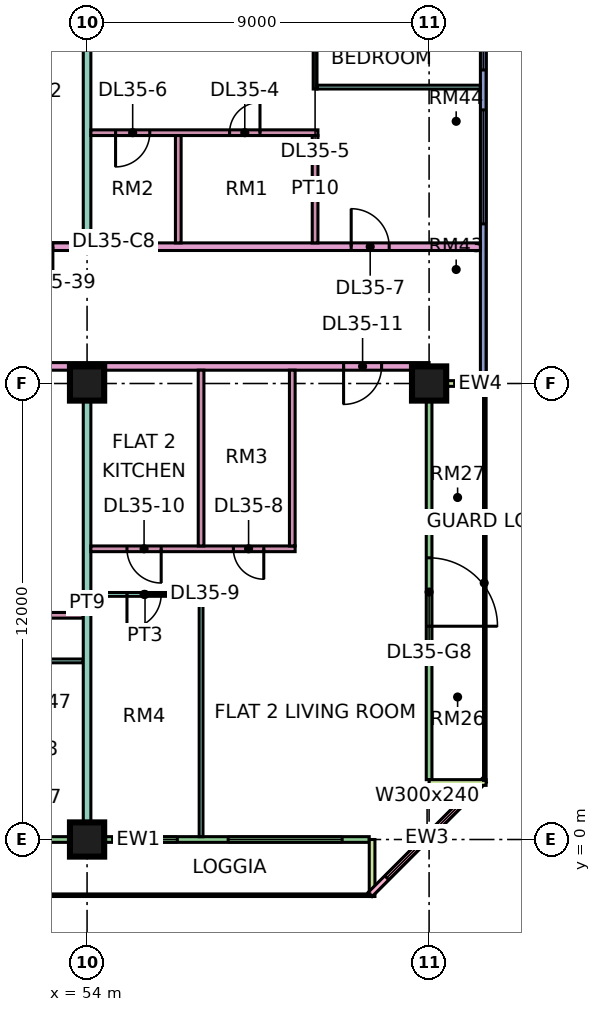
"""IFC4 building model, lengths in metres.
Left out: names, types, materials, properties, quantities, classifications, styles, units other than length and angle.
Written with IfcOpenShell. Run it as: python <this file> out.ifc"""

import sys

from ifc_helpers import new_model, si_unit, direction, frame, frame_2d, origin, origin_2d, place, context, subcontext, project, spatial, rectangle, extrude, element, fill, save


model = new_model("IFC4")
c1 = context("Model", 3, precision=1e-05, world=origin(), true_north=direction((0.0, 1.0)))
c2 = subcontext(c1, "Body", "Model", "MODEL_VIEW")
j1 = project(units=[si_unit("LENGTHUNIT", "METRE"), si_unit("PLANEANGLEUNIT", "RADIAN")], contexts=[c1])
p1 = place(None, origin())
s1 = spatial("IfcSite", under=j1, at=p1, CompositionType="ELEMENT")
p2 = place(p1, origin())
s2 = spatial("IfcBuilding", under=s1, at=p2, CompositionType="ELEMENT")
p3 = place(p2, frame((0.0, 0.0, 157.4)))
s3 = spatial("IfcBuildingStorey", under=s2, at=p3, CompositionType="ELEMENT", Elevation=157.4)
for number, where, z_axis, x_axis in (
    (1, (54.0, 0.0, 0.0), (0.0, 0.0, 1.0), (1.0, 0.0, 0.0)),
    (2, (54.0, 12.0, 0.0), (0.0, 0.0, 1.0), (1.0, 0.0, 0.0)),
    (3, (63.0, 12.0, 0.0), (0.0, 0.0, 1.0), (1.0, 0.0, 0.0)),
):
    element("IfcColumn", number, at=place(p3, frame(where, z_axis=z_axis, x_axis=x_axis)), inside=s3, PredefinedType="COLUMN", context=c2, shape_type="SweptSolid", body=[
        extrude(rectangle(XDim=0.9, YDim=0.9, at=origin_2d()), origin(), (0.0, 0.0, 1.0), 3.75),
    ])
p4 = place(p3, frame((48.075, 0.0, 0.0), z_axis=(0.0, 0.0, 1.0), x_axis=(1.0, 0.0, 0.0)))
e4 = element("IfcWall", 4, at=p4, inside=s3, PredefinedType="SOLIDWALL", context=c2, shape_type="SweptSolid", body=[
    extrude(rectangle(XDim=13.35, YDim=0.15, at=frame_2d((6.675, 0.0))), origin(), (0.0, 0.0, 1.0), 3.35),
])
p5 = place(p4, frame((0.562, 0.0, 0.45)))
e5 = element("IfcOpeningElement", 5, at=p5, cuts=e4, PredefinedType="OPENING", context=c2, shape_type="SweptSolid", body=[
    extrude(rectangle(XDim=1.8, YDim=2.4, at=frame_2d((0.9, 1.2))), frame((0.0, 0.085, 0.0), z_axis=(0.0, -1.0, 0.0), x_axis=(1.0, 0.0, 0.0)), (0.0, 0.0, 1.0), 0.17),
])
p6 = place(p4, frame((3.55, 0.0, 0.0)))
e6 = element("IfcOpeningElement", 6, at=p6, cuts=e4, PredefinedType="OPENING", context=c2, shape_type="SweptSolid", body=[
    extrude(rectangle(XDim=1.2, YDim=2.4, at=frame_2d((0.6, 1.2))), frame((0.0, 0.085, 0.0), z_axis=(0.0, -1.0, 0.0), x_axis=(1.0, 0.0, 0.0)), (0.0, 0.0, 1.0), 0.17),
])
p7 = place(p4, frame((7.1, 0.0, 0.45)))
e7 = element("IfcOpeningElement", 7, at=p7, cuts=e4, PredefinedType="OPENING", context=c2, shape_type="SweptSolid", body=[
    extrude(rectangle(XDim=1.2, YDim=2.4, at=frame_2d((0.6, 1.2))), frame((0.0, 0.085, 0.0), z_axis=(0.0, -1.0, 0.0), x_axis=(1.0, 0.0, 0.0)), (0.0, 0.0, 1.0), 0.17),
])
p8 = place(p4, frame((9.637, 0.0, 0.45)))
e8 = element("IfcOpeningElement", 8, at=p8, cuts=e4, PredefinedType="OPENING", context=c2, shape_type="SweptSolid", body=[
    extrude(rectangle(XDim=3.0, YDim=2.4, at=frame_2d((1.5, 1.2))), frame((0.0, 0.085, 0.0), z_axis=(0.0, -1.0, 0.0), x_axis=(1.0, 0.0, 0.0)), (0.0, 0.0, 1.0), 0.17),
])
p9 = place(p3, frame((61.5, -1.5, 0.0), z_axis=(0.0, 0.0, 1.0), x_axis=(0.0, 1.0, 0.0)))
e9 = element("IfcWall", 9, at=p9, inside=s3, PredefinedType="SOLIDWALL", context=c2, shape_type="SweptSolid", body=[
    extrude(rectangle(XDim=1.5, YDim=0.15, at=frame_2d((0.75, 0.0))), origin(), (0.0, 0.0, 1.0), 3.35),
])
p10 = place(p3, frame((61.447, -1.447, 0.0), z_axis=(0.0, 0.0, 1.0), x_axis=(0.707106781187, 0.707106781187, 0.0)))
e10 = element("IfcWall", 10, at=p10, inside=s3, PredefinedType="SOLIDWALL", context=c2, shape_type="SweptSolid", body=[
    extrude(rectangle(XDim=4.243, YDim=0.15, at=frame_2d((2.121, 0.0))), origin(), (0.0, 0.0, 1.0), 3.35),
])
p11 = place(p10, frame((0.621, 0.0, 0.45)))
e11 = element("IfcOpeningElement", 11, at=p11, cuts=e10, PredefinedType="OPENING", context=c2, shape_type="SweptSolid", body=[
    extrude(rectangle(XDim=3.0, YDim=2.4, at=frame_2d((1.5, 1.2))), frame((0.0, 0.085, 0.0), z_axis=(0.0, -1.0, 0.0), x_axis=(1.0, 0.0, 0.0)), (0.0, 0.0, 1.0), 0.17),
])
p12 = place(p3, frame((63.0, 1.575, 0.0), z_axis=(0.0, 0.0, 1.0), x_axis=(0.0, 1.0, 0.0)))
e12 = element("IfcWall", 12, at=p12, inside=s3, PredefinedType="SOLIDWALL", context=c2, shape_type="SweptSolid", body=[
    extrude(rectangle(XDim=10.35, YDim=0.15, at=frame_2d((5.175, 0.0))), origin(), (0.0, 0.0, 1.0), 3.35),
])
p13 = place(p12, frame((4.038, 0.0, 0.0)))
e13 = element("IfcOpeningElement", 13, at=p13, cuts=e12, PredefinedType="OPENING", context=c2, shape_type="SweptSolid", body=[
    extrude(rectangle(XDim=1.8, YDim=2.4, at=frame_2d((0.9, 1.2))), frame((0.0, 0.085, 0.0), z_axis=(0.0, -1.0, 0.0), x_axis=(1.0, 0.0, 0.0)), (0.0, 0.0, 1.0), 0.17),
])
for number, where, z_axis, x_axis in (
    (14, (64.5, 1.5, 0.0), (0.0, 0.0, 1.0), (-1.0, 0.0, 0.0)),
    (15, (64.5, 12.0, 0.0), (0.0, 0.0, 1.0), (-1.0, 0.0, 0.0)),
):
    element("IfcWall", number, at=place(p3, frame(where, z_axis=z_axis, x_axis=x_axis)), inside=s3, PredefinedType="SOLIDWALL", context=c2, shape_type="SweptSolid", body=[
        extrude(rectangle(XDim=1.5, YDim=0.15, at=frame_2d((0.75, 0.0))), origin(), (0.0, 0.0, 1.0), 3.35),
    ])
p14 = place(p3, frame((64.425, 12.075, 0.0), z_axis=(0.0, 0.0, 1.0), x_axis=(0.0, 1.0, 0.0)))
e16 = element("IfcWall", 16, at=p14, inside=s3, PredefinedType="SOLIDWALL", context=c2, shape_type="SweptSolid", body=[
    extrude(rectangle(XDim=10.425, YDim=0.15, at=frame_2d((5.212, 0.0))), origin(), (0.0, 0.0, 1.0), 3.35),
])
p15 = place(p14, frame((4.125, 0.0, 0.45)))
e17 = element("IfcOpeningElement", 17, at=p15, cuts=e16, PredefinedType="OPENING", context=c2, shape_type="SweptSolid", body=[
    extrude(rectangle(XDim=3.0, YDim=2.4, at=frame_2d((1.5, 1.2))), frame((0.0, 0.085, 0.0), z_axis=(0.0, -1.0, 0.0), x_axis=(1.0, 0.0, 0.0)), (0.0, 0.0, 1.0), 0.17),
])
p16 = place(p14, frame((8.175, 0.0, 0.45)))
e18 = element("IfcOpeningElement", 18, at=p16, cuts=e16, PredefinedType="OPENING", context=c2, shape_type="SweptSolid", body=[
    extrude(rectangle(XDim=1.8, YDim=2.4, at=frame_2d((0.9, 1.2))), frame((0.0, 0.085, 0.0), z_axis=(0.0, -1.0, 0.0), x_axis=(1.0, 0.0, 0.0)), (0.0, 0.0, 1.0), 0.17),
])
p17 = place(p3, frame((33.05, 4.7, 0.0), z_axis=(0.0, 0.0, 1.0), x_axis=(1.0, 0.0, 0.0)))
e19 = element("IfcWall", 19, at=p17, inside=s3, PredefinedType="PARTITIONING", context=c2, shape_type="SweptSolid", body=[
    extrude(rectangle(XDim=20.85, YDim=0.1, at=frame_2d((10.425, 0.0))), origin(), (0.0, 0.0, 1.0), 3.35),
])
p18 = place(p17, frame((1.0, 0.0, 0.0)))
e20 = element("IfcOpeningElement", 20, at=p18, cuts=e19, PredefinedType="OPENING", context=c2, shape_type="SweptSolid", body=[
    extrude(rectangle(XDim=0.9, YDim=2.1, at=frame_2d((0.45, 1.05))), frame((0.0, 0.06, 0.0), z_axis=(0.0, -1.0, 0.0), x_axis=(1.0, 0.0, 0.0)), (0.0, 0.0, 1.0), 0.12),
])
p19 = place(p17, frame((13.0, 0.0, 0.0)))
e21 = element("IfcOpeningElement", 21, at=p19, cuts=e19, PredefinedType="OPENING", context=c2, shape_type="SweptSolid", body=[
    extrude(rectangle(XDim=0.9, YDim=2.1, at=frame_2d((0.45, 1.05))), frame((0.0, 0.06, 0.0), z_axis=(0.0, -1.0, 0.0), x_axis=(1.0, 0.0, 0.0)), (0.0, 0.0, 1.0), 0.12),
])
p20 = place(p17, frame((16.0, 0.0, 0.0)))
e22 = element("IfcOpeningElement", 22, at=p20, cuts=e19, PredefinedType="OPENING", context=c2, shape_type="SweptSolid", body=[
    extrude(rectangle(XDim=0.9, YDim=2.1, at=frame_2d((0.45, 1.05))), frame((0.0, 0.06, 0.0), z_axis=(0.0, -1.0, 0.0), x_axis=(1.0, 0.0, 0.0)), (0.0, 0.0, 1.0), 0.12),
])
p21 = place(p17, frame((19.0, 0.0, 0.0)))
e23 = element("IfcOpeningElement", 23, at=p21, cuts=e19, PredefinedType="OPENING", context=c2, shape_type="SweptSolid", body=[
    extrude(rectangle(XDim=0.9, YDim=2.1, at=frame_2d((0.45, 1.05))), frame((0.0, 0.06, 0.0), z_axis=(0.0, -1.0, 0.0), x_axis=(1.0, 0.0, 0.0)), (0.0, 0.0, 1.0), 0.12),
])
p22 = place(p17, frame((7.0, 0.0, 0.0)))
e24 = element("IfcOpeningElement", 24, at=p22, cuts=e19, PredefinedType="OPENING", context=c2, shape_type="SweptSolid", body=[
    extrude(rectangle(XDim=0.9, YDim=2.1, at=frame_2d((0.45, 1.05))), frame((0.0, 0.06, 0.0), z_axis=(0.0, -1.0, 0.0), x_axis=(1.0, 0.0, 0.0)), (0.0, 0.0, 1.0), 0.12),
])
p23 = place(p3, frame((40.65, 12.45, 0.0), z_axis=(0.0, 0.0, 1.0), x_axis=(1.0, 0.0, 0.0)))
e25 = element("IfcWall", 25, at=p23, inside=s3, PredefinedType="PARTITIONING", context=c2, shape_type="SweptSolid", body=[
    extrude(rectangle(XDim=22.35, YDim=0.2, at=frame_2d((11.175, 0.0))), origin(), (0.0, 0.0, 1.0), 3.35),
])
p24 = place(p23, frame((20.1, 0.0, 0.0)))
e26 = element("IfcOpeningElement", 26, at=p24, cuts=e25, PredefinedType="OPENING", context=c2, shape_type="SweptSolid", body=[
    extrude(rectangle(XDim=1.0, YDim=2.1, at=frame_2d((0.5, 1.05))), frame((0.0, 0.11, 0.0), z_axis=(0.0, -1.0, 0.0), x_axis=(1.0, 0.0, 0.0)), (0.0, 0.0, 1.0), 0.22),
])
p25 = place(p23, frame((1.05, 0.0, 0.0)))
e27 = element("IfcOpeningElement", 27, at=p25, cuts=e25, PredefinedType="OPENING", context=c2, shape_type="SweptSolid", body=[
    extrude(rectangle(XDim=1.0, YDim=2.1, at=frame_2d((0.5, 1.05))), frame((0.0, 0.11, 0.0), z_axis=(0.0, -1.0, 0.0), x_axis=(1.0, 0.0, 0.0)), (0.0, 0.0, 1.0), 0.22),
])
p26 = place(p3, frame((43.575, 5.9, 0.0), z_axis=(0.0, 0.0, 1.0), x_axis=(1.0, 0.0, 0.0)))
e28 = element("IfcWall", 28, at=p26, inside=s3, PredefinedType="PARTITIONING", context=c2, shape_type="SweptSolid", body=[
    extrude(rectangle(XDim=10.325, YDim=0.15, at=frame_2d((5.163, 0.0))), origin(), (0.0, 0.0, 1.0), 3.35),
])
p27 = place(p26, frame((1.825, 0.0, 0.0)))
e29 = element("IfcOpeningElement", 29, at=p27, cuts=e28, PredefinedType="OPENING", context=c2, shape_type="SweptSolid", body=[
    extrude(rectangle(XDim=0.8, YDim=2.1, at=frame_2d((0.4, 1.05))), frame((0.0, 0.085, 0.0), z_axis=(0.0, -1.0, 0.0), x_axis=(1.0, 0.0, 0.0)), (0.0, 0.0, 1.0), 0.17),
])
p28 = place(p26, frame((6.975, 0.0, 0.0)))
e30 = element("IfcOpeningElement", 30, at=p28, cuts=e28, PredefinedType="OPENING", context=c2, shape_type="SweptSolid", body=[
    extrude(rectangle(XDim=0.9, YDim=2.1, at=frame_2d((0.45, 1.05))), frame((0.0, 0.085, 0.0), z_axis=(0.0, -1.0, 0.0), x_axis=(1.0, 0.0, 0.0)), (0.0, 0.0, 1.0), 0.17),
])
p29 = place(p3, frame((51.225, 15.6, 0.0), z_axis=(0.0, 0.0, 1.0), x_axis=(1.0, 0.0, 0.0)))
e31 = element("IfcWall", 31, at=p29, inside=s3, PredefinedType="PARTITIONING", context=c2, shape_type="SweptSolid", body=[
    extrude(rectangle(XDim=13.125, YDim=0.2, at=frame_2d((6.562, 0.0))), origin(), (0.0, 0.0, 1.0), 3.35),
])
p30 = place(p29, frame((9.725, 0.0, 0.0)))
e32 = element("IfcOpeningElement", 32, at=p30, cuts=e31, PredefinedType="OPENING", context=c2, shape_type="SweptSolid", body=[
    extrude(rectangle(XDim=1.0, YDim=2.1, at=frame_2d((0.5, 1.05))), frame((0.0, 0.11, 0.0), z_axis=(0.0, -1.0, 0.0), x_axis=(1.0, 0.0, 0.0)), (0.0, 0.0, 1.0), 0.22),
])
p31 = place(p29, frame((0.875, 0.0, 0.0)))
e33 = element("IfcOpeningElement", 33, at=p31, cuts=e31, PredefinedType="OPENING", context=c2, shape_type="SweptSolid", body=[
    extrude(rectangle(XDim=1.0, YDim=2.1, at=frame_2d((0.5, 1.05))), frame((0.0, 0.11, 0.0), z_axis=(0.0, -1.0, 0.0), x_axis=(1.0, 0.0, 0.0)), (0.0, 0.0, 1.0), 0.22),
])
p32 = place(p3, frame((54.0, 0.074, 0.0), z_axis=(0.0, 0.0, 1.0), x_axis=(0.0, 1.0, 0.0)))
e34 = element("IfcWall", 34, at=p32, inside=s3, PredefinedType="PARTITIONING", context=c2, shape_type="SweptSolid", body=[
    extrude(rectangle(XDim=12.276, YDim=0.2, at=frame_2d((6.138, 0.0))), origin(), (0.0, 0.0, 1.0), 3.35),
])
p33 = place(p3, frame((54.0, 15.7, 0.0), z_axis=(0.0, 0.0, 1.0), x_axis=(0.0, 1.0, 0.0)))
e35 = element("IfcWall", 35, at=p33, inside=s3, PredefinedType="PARTITIONING", context=c2, shape_type="SweptSolid", body=[
    extrude(rectangle(XDim=8.226, YDim=0.2, at=frame_2d((4.113, 0.0))), origin(), (0.0, 0.0, 1.0), 3.35),
])
p34 = place(p3, frame((54.1, 6.45, 0.0), z_axis=(0.0, 0.0, 1.0), x_axis=(1.0, 0.0, 0.0)))
e36 = element("IfcWall", 36, at=p34, inside=s3, PredefinedType="PARTITIONING", context=c2, shape_type="SweptSolid", body=[
    extrude(rectangle(XDim=2.85, YDim=0.1, at=frame_2d((1.425, 0.0))), origin(), (0.0, 0.0, 1.0), 3.35),
])
p35 = place(p34, frame((0.95, 0.0, 0.0)))
e37 = element("IfcOpeningElement", 37, at=p35, cuts=e36, PredefinedType="OPENING", context=c2, shape_type="SweptSolid", body=[
    extrude(rectangle(XDim=0.9, YDim=2.1, at=frame_2d((0.45, 1.05))), frame((0.0, 0.06, 0.0), z_axis=(0.0, -1.0, 0.0), x_axis=(1.0, 0.0, 0.0)), (0.0, 0.0, 1.0), 0.12),
])
p36 = place(p3, frame((54.1, 7.65, 0.0), z_axis=(0.0, 0.0, 1.0), x_axis=(1.0, 0.0, 0.0)))
e38 = element("IfcWall", 38, at=p36, inside=s3, PredefinedType="PARTITIONING", context=c2, shape_type="SweptSolid", body=[
    extrude(rectangle(XDim=5.375, YDim=0.15, at=frame_2d((2.688, 0.0))), origin(), (0.0, 0.0, 1.0), 3.35),
])
p37 = place(p36, frame((3.75, 0.0, 0.0)))
e39 = element("IfcOpeningElement", 39, at=p37, cuts=e38, PredefinedType="OPENING", context=c2, shape_type="SweptSolid", body=[
    extrude(rectangle(XDim=0.8, YDim=2.1, at=frame_2d((0.4, 1.05))), frame((0.0, 0.085, 0.0), z_axis=(0.0, -1.0, 0.0), x_axis=(1.0, 0.0, 0.0)), (0.0, 0.0, 1.0), 0.17),
])
p38 = place(p36, frame((0.95, 0.0, 0.0)))
e40 = element("IfcOpeningElement", 40, at=p38, cuts=e38, PredefinedType="OPENING", context=c2, shape_type="SweptSolid", body=[
    extrude(rectangle(XDim=0.9, YDim=2.1, at=frame_2d((0.45, 1.05))), frame((0.0, 0.085, 0.0), z_axis=(0.0, -1.0, 0.0), x_axis=(1.0, 0.0, 0.0)), (0.0, 0.0, 1.0), 0.17),
])
p39 = place(p3, frame((54.1, 18.6, 0.0), z_axis=(0.0, 0.0, 1.0), x_axis=(1.0, 0.0, 0.0)))
e41 = element("IfcWall", 41, at=p39, inside=s3, PredefinedType="PARTITIONING", context=c2, shape_type="SweptSolid", body=[
    extrude(rectangle(XDim=5.975, YDim=0.15, at=frame_2d((2.987, 0.0))), origin(), (0.0, 0.0, 1.0), 3.35),
])
p40 = place(p39, frame((3.65, 0.0, 0.0)))
e42 = element("IfcOpeningElement", 42, at=p40, cuts=e41, PredefinedType="OPENING", context=c2, shape_type="SweptSolid", body=[
    extrude(rectangle(XDim=0.8, YDim=2.1, at=frame_2d((0.4, 1.05))), frame((0.0, 0.085, 0.0), z_axis=(0.0, -1.0, 0.0), x_axis=(1.0, 0.0, 0.0)), (0.0, 0.0, 1.0), 0.17),
])
p41 = place(p39, frame((0.65, 0.0, 0.0)))
e43 = element("IfcOpeningElement", 43, at=p41, cuts=e41, PredefinedType="OPENING", context=c2, shape_type="SweptSolid", body=[
    extrude(rectangle(XDim=0.9, YDim=2.1, at=frame_2d((0.45, 1.05))), frame((0.0, 0.085, 0.0), z_axis=(0.0, -1.0, 0.0), x_axis=(1.0, 0.0, 0.0)), (0.0, 0.0, 1.0), 0.17),
])
p42 = place(p3, frame((56.4, 15.7, 0.0), z_axis=(0.0, 0.0, 1.0), x_axis=(0.0, 1.0, 0.0)))
e44 = element("IfcWall", 44, at=p42, inside=s3, PredefinedType="PARTITIONING", context=c2, shape_type="SweptSolid", body=[
    extrude(rectangle(XDim=2.825, YDim=0.15, at=frame_2d((1.413, 0.0))), origin(), (0.0, 0.0, 1.0), 3.35),
])
p43 = place(p3, frame((57.0, 0.074, 0.0), z_axis=(0.0, 0.0, 1.0), x_axis=(0.0, 1.0, 0.0)))
e45 = element("IfcWall", 45, at=p43, inside=s3, PredefinedType="PARTITIONING", context=c2, shape_type="SweptSolid", body=[
    extrude(rectangle(XDim=6.426, YDim=0.1, at=frame_2d((3.213, 0.0))), origin(), (0.0, 0.0, 1.0), 3.35),
])
for number, where, z_axis, x_axis in (
    (46, (57.0, 7.725, 0.0), (0.0, 0.0, 1.0), (0.0, 1.0, 0.0)),
    (47, (59.4, 7.725, 0.0), (0.0, 0.0, 1.0), (0.0, 1.0, 0.0)),
):
    element("IfcWall", number, at=place(p3, frame(where, z_axis=z_axis, x_axis=x_axis)), inside=s3, PredefinedType="PARTITIONING", context=c2, shape_type="SweptSolid", body=[
        extrude(rectangle(XDim=4.625, YDim=0.15, at=frame_2d((2.312, 0.0))), origin(), (0.0, 0.0, 1.0), 3.35),
    ])
p44 = place(p3, frame((60.0, 15.7, 0.0), z_axis=(0.0, 0.0, 1.0), x_axis=(0.0, 1.0, 0.0)))
e48 = element("IfcWall", 48, at=p44, inside=s3, PredefinedType="PARTITIONING", context=c2, shape_type="SweptSolid", body=[
    extrude(rectangle(XDim=2.825, YDim=0.15, at=frame_2d((1.413, 0.0))), origin(), (0.0, 0.0, 1.0), 3.35),
])
p45 = place(p3, frame((60.0, 19.75, 0.0), z_axis=(0.0, 0.0, 1.0), x_axis=(0.0, 1.0, 0.0)))
e49 = element("IfcWall", 49, at=p45, inside=s3, PredefinedType="PARTITIONING", context=c2, shape_type="SweptSolid", body=[
    extrude(rectangle(XDim=4.176, YDim=0.1, at=frame_2d((2.088, 0.0))), origin(), (0.0, 0.0, 1.0), 3.35),
])
p46 = place(p45, frame((1.7, 0.0, 0.0)))
e50 = element("IfcOpeningElement", 50, at=p46, cuts=e49, PredefinedType="OPENING", context=c2, shape_type="SweptSolid", body=[
    extrude(rectangle(XDim=0.9, YDim=2.1, at=frame_2d((0.45, 1.05))), frame((0.0, 0.06, 0.0), z_axis=(0.0, -1.0, 0.0), x_axis=(1.0, 0.0, 0.0)), (0.0, 0.0, 1.0), 0.12),
])
p47 = place(p3, frame((60.05, 19.8, 0.0), z_axis=(0.0, 0.0, 1.0), x_axis=(1.0, 0.0, 0.0)))
e51 = element("IfcWall", 51, at=p47, inside=s3, PredefinedType="PARTITIONING", context=c2, shape_type="SweptSolid", body=[
    extrude(rectangle(XDim=4.3, YDim=0.1, at=frame_2d((2.15, 0.0))), origin(), (0.0, 0.0, 1.0), 3.35),
])
p48 = place(p7, origin())
e52 = element("IfcWindow", 52, at=p48, inside=s3, PartitioningType="SINGLE_PANEL", PredefinedType="WINDOW", context=c2, shape_type="SweptSolid", body=[
    extrude(rectangle(XDim=1.2, YDim=2.4, at=frame_2d((0.6, 1.2))), frame((0.0, 0.03, 0.0), z_axis=(0.0, -1.0, 0.0), x_axis=(1.0, 0.0, 0.0)), (0.0, 0.0, 1.0), 0.06),
])
fill(e7, e52)
p49 = place(p8, origin())
e53 = element("IfcWindow", 53, at=p49, inside=s3, PartitioningType="SINGLE_PANEL", PredefinedType="WINDOW", context=c2, shape_type="SweptSolid", body=[
    extrude(rectangle(XDim=3.0, YDim=2.4, at=frame_2d((1.5, 1.2))), frame((0.0, 0.03, 0.0), z_axis=(0.0, -1.0, 0.0), x_axis=(1.0, 0.0, 0.0)), (0.0, 0.0, 1.0), 0.06),
])
fill(e8, e53)
p50 = place(p11, origin())
e54 = element("IfcWindow", 54, at=p50, inside=s3, PartitioningType="SINGLE_PANEL", PredefinedType="WINDOW", context=c2, shape_type="SweptSolid", body=[
    extrude(rectangle(XDim=3.0, YDim=2.4, at=frame_2d((1.5, 1.2))), frame((0.0, 0.03, 0.0), z_axis=(0.0, -1.0, 0.0), x_axis=(1.0, 0.0, 0.0)), (0.0, 0.0, 1.0), 0.06),
])
fill(e11, e54)
p51 = place(p13, frame((1.8, 0.0, 0.0), z_axis=(0.0, 0.0, 1.0), x_axis=(-1.0, 0.0, 0.0)))
e55 = element("IfcDoor", 55, at=p51, inside=s3, OperationType="DOUBLE_DOOR_SINGLE_SWING", PredefinedType="DOOR", context=c2, shape_type="SweptSolid", body=[
    extrude(rectangle(XDim=1.8, YDim=2.4, at=frame_2d((0.9, 1.2))), frame((0.0, 0.025, 0.0), z_axis=(0.0, -1.0, 0.0), x_axis=(1.0, 0.0, 0.0)), (0.0, 0.0, 1.0), 0.05),
])
fill(e13, e55)
p52 = place(p15, origin())
e56 = element("IfcWindow", 56, at=p52, inside=s3, PartitioningType="SINGLE_PANEL", PredefinedType="WINDOW", context=c2, shape_type="SweptSolid", body=[
    extrude(rectangle(XDim=3.0, YDim=2.4, at=frame_2d((1.5, 1.2))), frame((0.0, 0.03, 0.0), z_axis=(0.0, -1.0, 0.0), x_axis=(1.0, 0.0, 0.0)), (0.0, 0.0, 1.0), 0.06),
])
fill(e17, e56)
p53 = place(p16, origin())
e57 = element("IfcWindow", 57, at=p53, inside=s3, PartitioningType="SINGLE_PANEL", PredefinedType="WINDOW", context=c2, shape_type="SweptSolid", body=[
    extrude(rectangle(XDim=1.8, YDim=2.4, at=frame_2d((0.9, 1.2))), frame((0.0, 0.03, 0.0), z_axis=(0.0, -1.0, 0.0), x_axis=(1.0, 0.0, 0.0)), (0.0, 0.0, 1.0), 0.06),
])
fill(e18, e57)
p54 = place(p40, frame((0.8, 0.0, 0.0), z_axis=(0.0, 0.0, 1.0), x_axis=(-1.0, 0.0, 0.0)))
e58 = element("IfcDoor", 58, at=p54, inside=s3, OperationType="SINGLE_SWING_RIGHT", PredefinedType="DOOR", context=c2, shape_type="SweptSolid", body=[
    extrude(rectangle(XDim=0.8, YDim=2.1, at=frame_2d((0.4, 1.05))), frame((0.0, 0.025, 0.0), z_axis=(0.0, -1.0, 0.0), x_axis=(1.0, 0.0, 0.0)), (0.0, 0.0, 1.0), 0.05),
])
fill(e42, e58)
p55 = place(p41, frame((0.9, 0.0, 0.0), z_axis=(0.0, 0.0, 1.0), x_axis=(-1.0, 0.0, 0.0)))
e59 = element("IfcDoor", 59, at=p55, inside=s3, OperationType="SINGLE_SWING_LEFT", PredefinedType="DOOR", context=c2, shape_type="SweptSolid", body=[
    extrude(rectangle(XDim=0.9, YDim=2.1, at=frame_2d((0.45, 1.05))), frame((0.0, 0.025, 0.0), z_axis=(0.0, -1.0, 0.0), x_axis=(1.0, 0.0, 0.0)), (0.0, 0.0, 1.0), 0.05),
])
fill(e43, e59)
p56 = place(p30, origin())
e60 = element("IfcDoor", 60, at=p56, inside=s3, OperationType="SINGLE_SWING_LEFT", PredefinedType="DOOR", context=c2, shape_type="SweptSolid", body=[
    extrude(rectangle(XDim=1.0, YDim=2.1, at=frame_2d((0.5, 1.05))), frame((0.0, 0.025, 0.0), z_axis=(0.0, -1.0, 0.0), x_axis=(1.0, 0.0, 0.0)), (0.0, 0.0, 1.0), 0.05),
])
fill(e32, e60)
p57 = place(p37, origin())
e61 = element("IfcDoor", 61, at=p57, inside=s3, OperationType="SINGLE_SWING_RIGHT", PredefinedType="DOOR", context=c2, shape_type="SweptSolid", body=[
    extrude(rectangle(XDim=0.8, YDim=2.1, at=frame_2d((0.4, 1.05))), frame((0.0, 0.025, 0.0), z_axis=(0.0, -1.0, 0.0), x_axis=(1.0, 0.0, 0.0)), (0.0, 0.0, 1.0), 0.05),
])
fill(e39, e61)
p58 = place(p35, frame((0.9, 0.0, 0.0), z_axis=(0.0, 0.0, 1.0), x_axis=(-1.0, 0.0, 0.0)))
e62 = element("IfcDoor", 62, at=p58, inside=s3, OperationType="SINGLE_SWING_LEFT", PredefinedType="DOOR", context=c2, shape_type="SweptSolid", body=[
    extrude(rectangle(XDim=0.9, YDim=2.1, at=frame_2d((0.45, 1.05))), frame((0.0, 0.025, 0.0), z_axis=(0.0, -1.0, 0.0), x_axis=(1.0, 0.0, 0.0)), (0.0, 0.0, 1.0), 0.05),
])
fill(e37, e62)
p59 = place(p38, origin())
e63 = element("IfcDoor", 63, at=p59, inside=s3, OperationType="SINGLE_SWING_RIGHT", PredefinedType="DOOR", context=c2, shape_type="SweptSolid", body=[
    extrude(rectangle(XDim=0.9, YDim=2.1, at=frame_2d((0.45, 1.05))), frame((0.0, 0.025, 0.0), z_axis=(0.0, -1.0, 0.0), x_axis=(1.0, 0.0, 0.0)), (0.0, 0.0, 1.0), 0.05),
])
fill(e40, e63)
p60 = place(p24, frame((1.0, 0.0, 0.0), z_axis=(0.0, 0.0, 1.0), x_axis=(-1.0, 0.0, 0.0)))
e64 = element("IfcDoor", 64, at=p60, inside=s3, OperationType="SINGLE_SWING_LEFT", PredefinedType="DOOR", context=c2, shape_type="SweptSolid", body=[
    extrude(rectangle(XDim=1.0, YDim=2.1, at=frame_2d((0.5, 1.05))), frame((0.0, 0.025, 0.0), z_axis=(0.0, -1.0, 0.0), x_axis=(1.0, 0.0, 0.0)), (0.0, 0.0, 1.0), 0.05),
])
fill(e26, e64)
p61 = place(p31, origin())
e65 = element("IfcDoor", 65, at=p61, inside=s3, OperationType="SINGLE_SWING_RIGHT", PredefinedType="DOOR", context=c2, shape_type="SweptSolid", body=[
    extrude(rectangle(XDim=1.0, YDim=2.1, at=frame_2d((0.5, 1.05))), frame((0.0, 0.025, 0.0), z_axis=(0.0, -1.0, 0.0), x_axis=(1.0, 0.0, 0.0)), (0.0, 0.0, 1.0), 0.05),
])
fill(e33, e65)
save(model, sys.argv[1])
